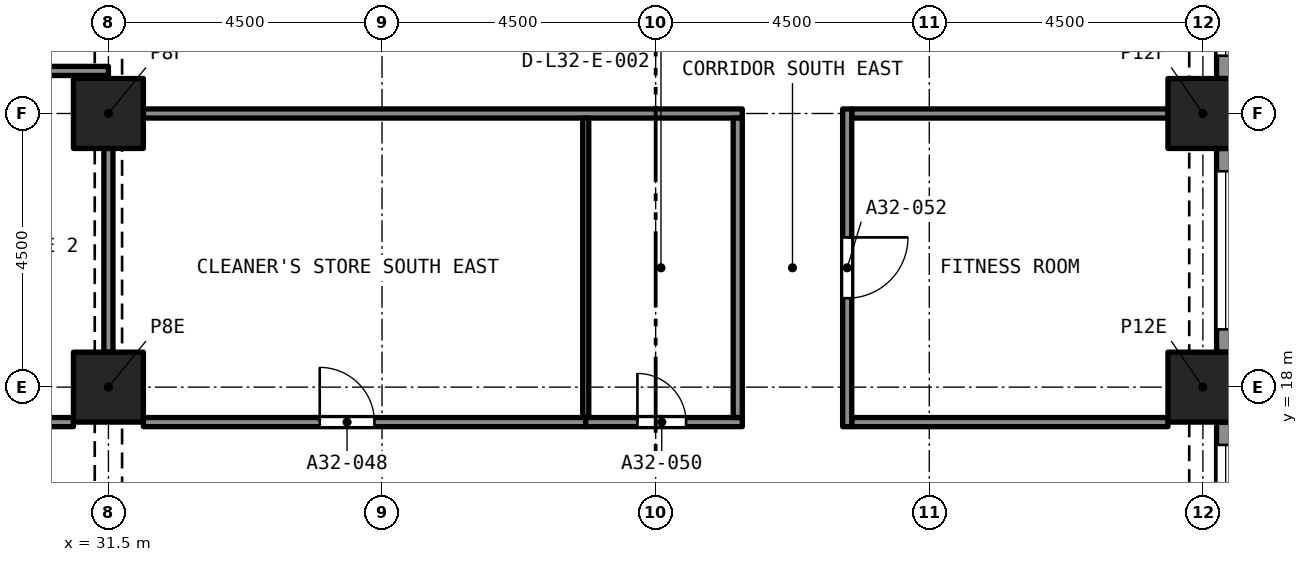
"""IFC4 building model, lengths in metres.
Left out: names, types, materials, properties, quantities, classifications, styles, units other than length and angle.
Written with IfcOpenShell. Run it as: python <this file> out.ifc"""

import sys

from ifc_helpers import new_model, si_unit, direction, frame, frame_2d, origin, origin_2d, place, context, subcontext, project, spatial, rectangle, extrude, element, fill, save


model = new_model("IFC4")
c1 = context("Model", 3, precision=1e-05, world=origin(), true_north=direction((0.0, 1.0)))
c2 = subcontext(c1, "Body", "Model", "MODEL_VIEW")
j1 = project(units=[si_unit("LENGTHUNIT", "METRE"), si_unit("PLANEANGLEUNIT", "RADIAN")], contexts=[c1])
p1 = place(None, origin())
s1 = spatial("IfcSite", under=j1, at=p1, CompositionType="ELEMENT")
p2 = place(p1, origin())
s2 = spatial("IfcBuilding", under=s1, at=p2, CompositionType="ELEMENT")
p3 = place(p2, frame((0.0, 0.0, 115.2)))
s3 = spatial("IfcBuildingStorey", under=s2, at=p3, CompositionType="ELEMENT", Elevation=115.2)
for number, where, z_axis, x_axis in (
    (1, (31.5, 18.0, 0.0), (0.0, 0.0, 1.0), (1.0, 0.0, 0.0)),
    (2, (49.5, 18.0, 0.0), (0.0, 0.0, 1.0), (1.0, 0.0, 0.0)),
    (3, (31.5, 22.5, 0.0), (0.0, 0.0, 1.0), (1.0, 0.0, 0.0)),
    (4, (49.5, 22.5, 0.0), (0.0, 0.0, 1.0), (1.0, 0.0, 0.0)),
):
    element("IfcColumn", number, at=place(p3, frame(where, z_axis=z_axis, x_axis=x_axis)), inside=s3, PredefinedType="COLUMN", context=c2, shape_type="SweptSolid", body=[
        extrude(rectangle(XDim=1.15, YDim=1.15, at=origin_2d()), origin(), (0.0, 0.0, 1.0), 3.2),
    ])
p4 = place(p3, frame((49.875, 17.425, 0.0), z_axis=(0.0, 0.0, 1.0), x_axis=(0.0, -1.0, 0.0)))
e5 = element("IfcWall", 5, at=p4, inside=s3, PredefinedType="SOLIDWALL", context=c2, shape_type="SweptSolid", body=[
    extrude(rectangle(XDim=3.35, YDim=0.3, at=frame_2d((1.675, 0.0))), origin(), (0.0, 0.0, 1.0), 3.2),
])
p5 = place(p4, frame((0.375, 0.0, 0.45)))
e6 = element("IfcOpeningElement", 6, at=p5, cuts=e5, PredefinedType="OPENING", context=c2, shape_type="SweptSolid", body=[
    extrude(rectangle(XDim=2.6, YDim=1.95, at=frame_2d((1.3, 0.975))), frame((0.0, 0.16, 0.0), z_axis=(0.0, -1.0, 0.0), x_axis=(1.0, 0.0, 0.0)), (0.0, 0.0, 1.0), 0.32),
])
p6 = place(p3, frame((49.875, 21.925, 0.0), z_axis=(0.0, 0.0, 1.0), x_axis=(0.0, -1.0, 0.0)))
e7 = element("IfcWall", 7, at=p6, inside=s3, PredefinedType="SOLIDWALL", context=c2, shape_type="SweptSolid", body=[
    extrude(rectangle(XDim=3.35, YDim=0.3, at=frame_2d((1.675, 0.0))), origin(), (0.0, 0.0, 1.0), 3.2),
])
p7 = place(p6, frame((0.375, 0.0, 0.45)))
e8 = element("IfcOpeningElement", 8, at=p7, cuts=e7, PredefinedType="OPENING", context=c2, shape_type="SweptSolid", body=[
    extrude(rectangle(XDim=2.6, YDim=1.95, at=frame_2d((1.3, 0.975))), frame((0.0, 0.16, 0.0), z_axis=(0.0, -1.0, 0.0), x_axis=(1.0, 0.0, 0.0)), (0.0, 0.0, 1.0), 0.32),
])
p8 = place(p3, frame((49.875, 26.425, 0.0), z_axis=(0.0, 0.0, 1.0), x_axis=(0.0, -1.0, 0.0)))
e9 = element("IfcWall", 9, at=p8, inside=s3, PredefinedType="SOLIDWALL", context=c2, shape_type="SweptSolid", body=[
    extrude(rectangle(XDim=3.35, YDim=0.3, at=frame_2d((1.675, 0.0))), origin(), (0.0, 0.0, 1.0), 3.2),
])
p9 = place(p8, frame((0.375, 0.0, 0.45)))
e10 = element("IfcOpeningElement", 10, at=p9, cuts=e9, PredefinedType="OPENING", context=c2, shape_type="SweptSolid", body=[
    extrude(rectangle(XDim=2.6, YDim=1.95, at=frame_2d((1.3, 0.975))), frame((0.0, 0.16, 0.0), z_axis=(0.0, -1.0, 0.0), x_axis=(1.0, 0.0, 0.0)), (0.0, 0.0, 1.0), 0.32),
])
p10 = place(p3, frame((25.725, 17.425, 0.0), z_axis=(0.0, 0.0, 1.0), x_axis=(1.0, 0.0, 0.0)))
e11 = element("IfcWall", 11, at=p10, inside=s3, PredefinedType="PARTITIONING", context=c2, shape_type="SweptSolid", body=[
    extrude(rectangle(XDim=5.2, YDim=0.15, at=frame_2d((2.6, 0.0))), origin(), (0.0, 0.0, 1.0), 2.75),
])
p11 = place(p3, frame((32.075, 17.425, 0.0), z_axis=(0.0, 0.0, 1.0), x_axis=(1.0, 0.0, 0.0)))
e12 = element("IfcWall", 12, at=p11, inside=s3, PredefinedType="PARTITIONING", context=c2, shape_type="SweptSolid", body=[
    extrude(rectangle(XDim=7.275, YDim=0.15, at=frame_2d((3.638, 0.0))), origin(), (0.0, 0.0, 1.0), 2.9),
])
p12 = place(p11, frame((2.9, 0.0, 0.0)))
e13 = element("IfcOpeningElement", 13, at=p12, cuts=e12, PredefinedType="OPENING", context=c2, shape_type="SweptSolid", body=[
    extrude(rectangle(XDim=0.9, YDim=2.1, at=frame_2d((0.45, 1.05))), frame((0.0, 0.085, 0.0), z_axis=(0.0, -1.0, 0.0), x_axis=(1.0, 0.0, 0.0)), (0.0, 0.0, 1.0), 0.17),
])
p13 = place(p3, frame((39.35, 17.425, 0.0), z_axis=(0.0, 0.0, 1.0), x_axis=(1.0, 0.0, 0.0)))
e14 = element("IfcWall", 14, at=p13, inside=s3, PredefinedType="PARTITIONING", context=c2, shape_type="SweptSolid", body=[
    extrude(rectangle(XDim=2.575, YDim=0.15, at=frame_2d((1.288, 0.0))), origin(), (0.0, 0.0, 1.0), 2.9),
])
p14 = place(p13, frame((0.85, 0.0, 0.0)))
e15 = element("IfcOpeningElement", 15, at=p14, cuts=e14, PredefinedType="OPENING", context=c2, shape_type="SweptSolid", body=[
    extrude(rectangle(XDim=0.8, YDim=2.1, at=frame_2d((0.4, 1.05))), frame((0.0, 0.085, 0.0), z_axis=(0.0, -1.0, 0.0), x_axis=(1.0, 0.0, 0.0)), (0.0, 0.0, 1.0), 0.17),
])
p15 = place(p3, frame((43.725, 17.425, 0.0), z_axis=(0.0, 0.0, 1.0), x_axis=(1.0, 0.0, 0.0)))
e16 = element("IfcWall", 16, at=p15, inside=s3, PredefinedType="PARTITIONING", context=c2, shape_type="SweptSolid", body=[
    extrude(rectangle(XDim=5.2, YDim=0.15, at=frame_2d((2.6, 0.0))), origin(), (0.0, 0.0, 1.0), 2.9),
])
p16 = place(p3, frame((25.725, 23.2, 0.0), z_axis=(0.0, 0.0, 1.0), x_axis=(1.0, 0.0, 0.0)))
e17 = element("IfcWall", 17, at=p16, inside=s3, PredefinedType="PARTITIONING", context=c2, shape_type="SweptSolid", body=[
    extrude(rectangle(XDim=5.775, YDim=0.15, at=frame_2d((2.887, 0.0))), origin(), (0.0, 0.0, 1.0), 2.75),
])
p17 = place(p3, frame((31.5, 18.575, 0.0), z_axis=(0.0, 0.0, 1.0), x_axis=(0.0, 1.0, 0.0)))
e18 = element("IfcWall", 18, at=p17, inside=s3, PredefinedType="PARTITIONING", context=c2, shape_type="SweptSolid", body=[
    extrude(rectangle(XDim=3.35, YDim=0.15, at=frame_2d((1.675, 0.0))), origin(), (0.0, 0.0, 1.0), 2.38),
])
p18 = place(p3, frame((32.075, 22.5, 0.0), z_axis=(0.0, 0.0, 1.0), x_axis=(1.0, 0.0, 0.0)))
e19 = element("IfcWall", 19, at=p18, inside=s3, PredefinedType="PARTITIONING", context=c2, shape_type="SweptSolid", body=[
    extrude(rectangle(XDim=9.85, YDim=0.15, at=frame_2d((4.925, 0.0))), origin(), (0.0, 0.0, 1.0), 2.9),
])
p19 = place(p3, frame((43.725, 22.5, 0.0), z_axis=(0.0, 0.0, 1.0), x_axis=(1.0, 0.0, 0.0)))
e20 = element("IfcWall", 20, at=p19, inside=s3, PredefinedType="PARTITIONING", context=c2, shape_type="SweptSolid", body=[
    extrude(rectangle(XDim=5.2, YDim=0.15, at=frame_2d((2.6, 0.0))), origin(), (0.0, 0.0, 1.0), 2.9),
])
p20 = place(p3, frame((41.85, 17.5, 0.0), z_axis=(0.0, 0.0, 1.0), x_axis=(0.0, 1.0, 0.0)))
e21 = element("IfcWall", 21, at=p20, inside=s3, PredefinedType="PARTITIONING", context=c2, shape_type="SweptSolid", body=[
    extrude(rectangle(XDim=4.925, YDim=0.15, at=frame_2d((2.462, 0.0))), origin(), (0.0, 0.0, 1.0), 2.9),
])
p21 = place(p3, frame((43.65, 22.575, 0.0), z_axis=(0.0, 0.0, 1.0), x_axis=(0.0, -1.0, 0.0)))
e22 = element("IfcWall", 22, at=p21, inside=s3, PredefinedType="PARTITIONING", context=c2, shape_type="SweptSolid", body=[
    extrude(rectangle(XDim=5.225, YDim=0.15, at=frame_2d((2.612, 0.0))), origin(), (0.0, 0.0, 1.0), 2.9),
])
p22 = place(p21, frame((2.113, 0.0, 0.0)))
e23 = element("IfcOpeningElement", 23, at=p22, cuts=e22, PredefinedType="OPENING", context=c2, shape_type="SweptSolid", body=[
    extrude(rectangle(XDim=1.0, YDim=2.1, at=frame_2d((0.5, 1.05))), frame((0.0, 0.085, 0.0), z_axis=(0.0, -1.0, 0.0), x_axis=(1.0, 0.0, 0.0)), (0.0, 0.0, 1.0), 0.17),
])
p23 = place(p3, frame((39.35, 17.5, 0.0), z_axis=(0.0, 0.0, 1.0), x_axis=(0.0, 1.0, 0.0)))
e24 = element("IfcWall", 24, at=p23, inside=s3, PredefinedType="PARTITIONING", context=c2, shape_type="SweptSolid", body=[
    extrude(rectangle(XDim=4.925, YDim=0.1, at=frame_2d((2.462, 0.0))), origin(), (0.0, 0.0, 1.0), 2.9),
])
p24 = place(p5, origin())
e25 = element("IfcWindow", 25, at=p24, inside=s3, PartitioningType="SINGLE_PANEL", PredefinedType="WINDOW", context=c2, shape_type="SweptSolid", body=[
    extrude(rectangle(XDim=2.6, YDim=1.95, at=frame_2d((1.3, 0.975))), frame((0.0, 0.03, 0.0), z_axis=(0.0, -1.0, 0.0), x_axis=(1.0, 0.0, 0.0)), (0.0, 0.0, 1.0), 0.06),
])
fill(e6, e25)
p25 = place(p7, origin())
e26 = element("IfcWindow", 26, at=p25, inside=s3, PartitioningType="SINGLE_PANEL", PredefinedType="WINDOW", context=c2, shape_type="SweptSolid", body=[
    extrude(rectangle(XDim=2.6, YDim=1.95, at=frame_2d((1.3, 0.975))), frame((0.0, 0.03, 0.0), z_axis=(0.0, -1.0, 0.0), x_axis=(1.0, 0.0, 0.0)), (0.0, 0.0, 1.0), 0.06),
])
fill(e8, e26)
p26 = place(p9, origin())
e27 = element("IfcWindow", 27, at=p26, inside=s3, PartitioningType="SINGLE_PANEL", PredefinedType="WINDOW", context=c2, shape_type="SweptSolid", body=[
    extrude(rectangle(XDim=2.6, YDim=1.95, at=frame_2d((1.3, 0.975))), frame((0.0, 0.03, 0.0), z_axis=(0.0, -1.0, 0.0), x_axis=(1.0, 0.0, 0.0)), (0.0, 0.0, 1.0), 0.06),
])
fill(e10, e27)
p27 = place(p12, origin())
e28 = element("IfcDoor", 28, at=p27, inside=s3, OperationType="SINGLE_SWING_LEFT", PredefinedType="DOOR", context=c2, shape_type="SweptSolid", body=[
    extrude(rectangle(XDim=0.9, YDim=2.1, at=frame_2d((0.45, 1.05))), frame((0.0, 0.025, 0.0), z_axis=(0.0, -1.0, 0.0), x_axis=(1.0, 0.0, 0.0)), (0.0, 0.0, 1.0), 0.05),
])
fill(e13, e28)
p28 = place(p14, origin())
e29 = element("IfcDoor", 29, at=p28, inside=s3, OperationType="SINGLE_SWING_LEFT", PredefinedType="DOOR", context=c2, shape_type="SweptSolid", body=[
    extrude(rectangle(XDim=0.8, YDim=2.1, at=frame_2d((0.4, 1.05))), frame((0.0, 0.025, 0.0), z_axis=(0.0, -1.0, 0.0), x_axis=(1.0, 0.0, 0.0)), (0.0, 0.0, 1.0), 0.05),
])
fill(e15, e29)
p29 = place(p22, origin())
e30 = element("IfcDoor", 30, at=p29, inside=s3, OperationType="SINGLE_SWING_RIGHT", PredefinedType="DOOR", context=c2, shape_type="SweptSolid", body=[
    extrude(rectangle(XDim=1.0, YDim=2.1, at=frame_2d((0.5, 1.05))), frame((0.0, 0.025, 0.0), z_axis=(0.0, -1.0, 0.0), x_axis=(1.0, 0.0, 0.0)), (0.0, 0.0, 1.0), 0.05),
])
fill(e23, e30)
save(model, sys.argv[1])
